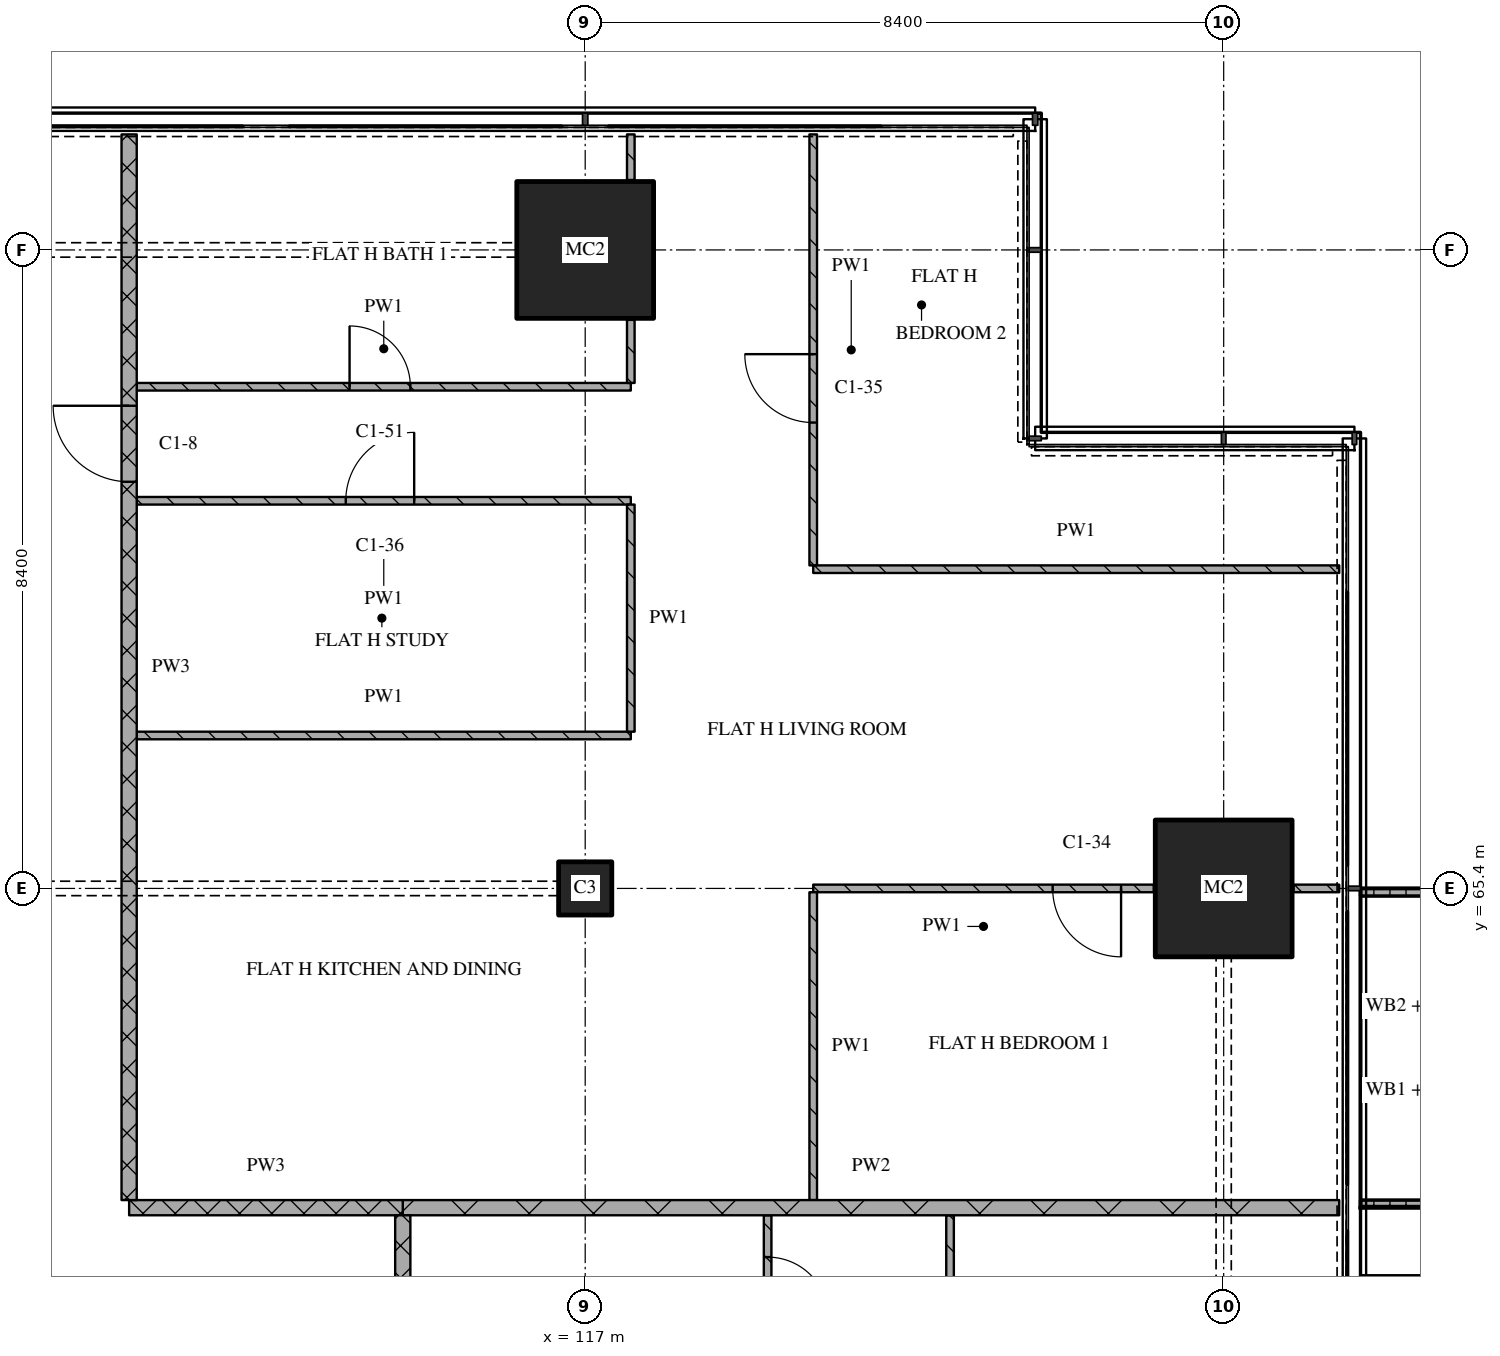
"""IFC4 building model, lengths in metres.
Left out: names, types, materials, properties, quantities, classifications, styles, units other than length and angle.
Written with IfcOpenShell. Run it as: python <this file> out.ifc"""

import sys

from ifc_helpers import new_model, si_unit, direction, frame, frame_2d, origin, origin_2d, place, context, subcontext, project, spatial, polyline, rectangle, outline, extrude, element, fill, save


model = new_model("IFC4")
c1 = context("Model", 3, precision=1e-05, world=origin(), true_north=direction((0.0, 1.0)))
c2 = subcontext(c1, "Body", "Model", "MODEL_VIEW")
j1 = project(units=[si_unit("LENGTHUNIT", "METRE"), si_unit("PLANEANGLEUNIT", "RADIAN")], contexts=[c1])
p1 = place(None, origin())
s1 = spatial("IfcSite", under=j1, at=p1, CompositionType="ELEMENT")
p2 = place(p1, origin())
s2 = spatial("IfcBuilding", under=s1, at=p2, CompositionType="ELEMENT")
p3 = place(p2, frame((0.0, 0.0, 154.65)))
s3 = spatial("IfcBuildingStorey", under=s2, at=p3, CompositionType="ELEMENT", Elevation=154.65)
p4 = place(p3, frame((117.0, 65.4, 0.0), z_axis=(0.0, 0.0, 1.0), x_axis=(1.0, 0.0, 0.0)))
e1 = element("IfcColumn", 1, at=p4, inside=s3, PredefinedType="COLUMN", context=c2, shape_type="SweptSolid", body=[
    extrude(rectangle(XDim=0.7, YDim=0.7, at=origin_2d()), origin(), (0.0, 0.0, 1.0), 3.6),
])
for number, where, z_axis, x_axis in (
    (2, (117.0, 73.8, 0.0), (0.0, 0.0, 1.0), (1.0, 0.0, 0.0)),
    (3, (125.4, 65.4, 0.0), (0.0, 0.0, 1.0), (1.0, 0.0, 0.0)),
):
    element("IfcColumn", number, at=place(p3, frame(where, z_axis=z_axis, x_axis=x_axis)), inside=s3, PredefinedType="COLUMN", context=c2, shape_type="SweptSolid", body=[
        extrude(rectangle(XDim=1.8, YDim=1.8, at=origin_2d()), origin(), (0.0, 0.0, 1.0), 3.6),
    ])
p5 = place(p3, origin())
e4 = element("IfcWall", 4, at=p5, inside=s3, PredefinedType="SOLIDWALL", context=c2, shape_type="SweptSolid", body=[
    extrude(outline(polyline([(127.2, 61.2), (127.2, 61.3), (128.833, 61.3), (128.833, 65.3), (127.2, 65.3), (127.2, 65.4), (128.933, 65.4), (128.933, 61.2), (127.2, 61.2)])), origin(), (0.0, 0.0, 1.0), 1.0),
])
p6 = place(p3, frame((111.0, 61.2, 0.0), z_axis=(0.0, 0.0, 1.0), x_axis=(1.0, 0.0, 0.0)))
e5 = element("IfcWall", 5, at=p6, inside=s3, PredefinedType="PARTITIONING", context=c2, shape_type="SweptSolid", body=[
    extrude(rectangle(XDim=3.6, YDim=0.2, at=frame_2d((1.8, 0.0))), origin(), (0.0, 0.0, 1.0), 3.32),
])
p7 = place(p3, frame((114.6, 61.2, 0.0), z_axis=(0.0, 0.0, 1.0), x_axis=(1.0, 0.0, 0.0)))
e6 = element("IfcWall", 6, at=p7, inside=s3, PredefinedType="PARTITIONING", context=c2, shape_type="SweptSolid", body=[
    extrude(rectangle(XDim=12.32, YDim=0.2, at=frame_2d((6.16, 0.0))), origin(), (0.0, 0.0, 1.0), 3.32),
])
p8 = place(p3, frame((124.48, 65.4, 0.0), z_axis=(0.0, 0.0, 1.0), x_axis=(-1.0, 0.0, 0.0)))
e7 = element("IfcWall", 7, at=p8, inside=s3, PredefinedType="PARTITIONING", context=c2, shape_type="SweptSolid", body=[
    extrude(rectangle(XDim=4.48, YDim=0.1, at=frame_2d((2.24, 0.0))), origin(), (0.0, 0.0, 1.0), 3.32),
])
p9 = place(p8, frame((0.43, 0.0, 0.0)))
e8 = element("IfcOpeningElement", 8, at=p9, cuts=e7, PredefinedType="OPENING", context=c2, shape_type="SweptSolid", body=[
    extrude(rectangle(XDim=0.9, YDim=2.1, at=frame_2d((0.45, 1.05))), frame((0.0, 0.06, 0.0), z_axis=(0.0, -1.0, 0.0), x_axis=(1.0, 0.0, 0.0)), (0.0, 0.0, 1.0), 0.12),
])
p10 = place(p3, frame((126.32, 65.4, 0.0), z_axis=(0.0, 0.0, 1.0), x_axis=(1.0, 0.0, 0.0)))
e9 = element("IfcWall", 9, at=p10, inside=s3, PredefinedType="PARTITIONING", context=c2, shape_type="SweptSolid", body=[
    extrude(rectangle(XDim=0.6, YDim=0.1, at=frame_2d((0.3, 0.0))), origin(), (0.0, 0.0, 1.0), 3.32),
])
p11 = place(p3, frame((111.1, 67.412, 0.0), z_axis=(0.0, 0.0, 1.0), x_axis=(1.0, 0.0, 0.0)))
e10 = element("IfcWall", 10, at=p11, inside=s3, PredefinedType="PARTITIONING", context=c2, shape_type="SweptSolid", body=[
    extrude(rectangle(XDim=6.5, YDim=0.1, at=frame_2d((3.25, 0.0))), origin(), (0.0, 0.0, 1.0), 3.32),
])
p12 = place(p3, frame((120.0, 69.6, 0.0), z_axis=(0.0, 0.0, 1.0), x_axis=(1.0, 0.0, 0.0)))
e11 = element("IfcWall", 11, at=p12, inside=s3, PredefinedType="PARTITIONING", context=c2, shape_type="SweptSolid", body=[
    extrude(rectangle(XDim=6.92, YDim=0.1, at=frame_2d((3.46, 0.0))), origin(), (0.0, 0.0, 1.0), 3.32),
])
p13 = place(p3, frame((117.6, 70.5, 0.0), z_axis=(0.0, 0.0, 1.0), x_axis=(-1.0, 0.0, 0.0)))
e12 = element("IfcWall", 12, at=p13, inside=s3, PredefinedType="PARTITIONING", context=c2, shape_type="SweptSolid", body=[
    extrude(rectangle(XDim=6.5, YDim=0.1, at=frame_2d((3.25, 0.0))), origin(), (0.0, 0.0, 1.0), 3.32),
])
p14 = place(p13, frame((2.85, 0.0, 0.0)))
e13 = element("IfcOpeningElement", 13, at=p14, cuts=e12, PredefinedType="OPENING", context=c2, shape_type="SweptSolid", body=[
    extrude(rectangle(XDim=0.9, YDim=2.1, at=frame_2d((0.45, 1.05))), frame((0.0, 0.06, 0.0), z_axis=(0.0, -1.0, 0.0), x_axis=(1.0, 0.0, 0.0)), (0.0, 0.0, 1.0), 0.12),
])
p15 = place(p3, frame((111.1, 72.0, 0.0), z_axis=(0.0, 0.0, 1.0), x_axis=(1.0, 0.0, 0.0)))
e14 = element("IfcWall", 14, at=p15, inside=s3, PredefinedType="PARTITIONING", context=c2, shape_type="SweptSolid", body=[
    extrude(rectangle(XDim=6.5, YDim=0.1, at=frame_2d((3.25, 0.0))), origin(), (0.0, 0.0, 1.0), 3.32),
])
p16 = place(p15, frame((2.8, 0.0, 0.0)))
e15 = element("IfcOpeningElement", 15, at=p16, cuts=e14, PredefinedType="OPENING", context=c2, shape_type="SweptSolid", body=[
    extrude(rectangle(XDim=0.8, YDim=2.1, at=frame_2d((0.4, 1.05))), frame((0.0, 0.06, 0.0), z_axis=(0.0, -1.0, 0.0), x_axis=(1.0, 0.0, 0.0)), (0.0, 0.0, 1.0), 0.12),
])
p17 = place(p3, frame((111.0, 75.32, 0.0), z_axis=(0.0, 0.0, 1.0), x_axis=(0.0, -1.0, 0.0)))
e16 = element("IfcWall", 16, at=p17, inside=s3, PredefinedType="PARTITIONING", context=c2, shape_type="SweptSolid", body=[
    extrude(rectangle(XDim=14.02, YDim=0.2, at=frame_2d((7.01, 0.0))), origin(), (0.0, 0.0, 1.0), 3.32),
])
p18 = place(p17, frame((3.57, 0.0, 0.0)))
e17 = element("IfcOpeningElement", 17, at=p18, cuts=e16, PredefinedType="OPENING", context=c2, shape_type="SweptSolid", body=[
    extrude(rectangle(XDim=1.0, YDim=2.1, at=frame_2d((0.5, 1.05))), frame((0.0, 0.11, 0.0), z_axis=(0.0, -1.0, 0.0), x_axis=(1.0, 0.0, 0.0)), (0.0, 0.0, 1.0), 0.22),
])
p19 = place(p3, frame((114.6, 61.1, 0.0), z_axis=(0.0, 0.0, 1.0), x_axis=(0.0, -1.0, 0.0)))
e18 = element("IfcWall", 18, at=p19, inside=s3, PredefinedType="PARTITIONING", context=c2, shape_type="SweptSolid", body=[
    extrude(rectangle(XDim=17.8, YDim=0.2, at=frame_2d((8.9, 0.0))), origin(), (0.0, 0.0, 1.0), 3.32),
])
p20 = place(p19, frame((4.65, 0.0, 0.0)))
e19 = element("IfcOpeningElement", 19, at=p20, cuts=e18, PredefinedType="OPENING", context=c2, shape_type="SweptSolid", body=[
    extrude(rectangle(XDim=1.0, YDim=2.1, at=frame_2d((0.5, 1.05))), frame((0.0, 0.11, 0.0), z_axis=(0.0, -1.0, 0.0), x_axis=(1.0, 0.0, 0.0)), (0.0, 0.0, 1.0), 0.22),
])
p21 = place(p3, frame((117.6, 70.45, 0.0), z_axis=(0.0, 0.0, 1.0), x_axis=(0.0, -1.0, 0.0)))
e20 = element("IfcWall", 20, at=p21, inside=s3, PredefinedType="PARTITIONING", context=c2, shape_type="SweptSolid", body=[
    extrude(rectangle(XDim=2.988, YDim=0.1, at=frame_2d((1.494, 0.0))), origin(), (0.0, 0.0, 1.0), 3.32),
])
p22 = place(p3, frame((117.6, 72.88, 0.0), z_axis=(0.0, 0.0, 1.0), x_axis=(0.0, -1.0, 0.0)))
e21 = element("IfcWall", 21, at=p22, inside=s3, PredefinedType="PARTITIONING", context=c2, shape_type="SweptSolid", body=[
    extrude(rectangle(XDim=0.83, YDim=0.1, at=frame_2d((0.415, 0.0))), origin(), (0.0, 0.0, 1.0), 3.32),
])
p23 = place(p3, frame((117.6, 75.32, 0.0), z_axis=(0.0, 0.0, 1.0), x_axis=(0.0, -1.0, 0.0)))
e22 = element("IfcWall", 22, at=p23, inside=s3, PredefinedType="PARTITIONING", context=c2, shape_type="SweptSolid", body=[
    extrude(rectangle(XDim=0.6, YDim=0.1, at=frame_2d((0.3, 0.0))), origin(), (0.0, 0.0, 1.0), 3.32),
])
p24 = place(p3, frame((119.4, 56.75, 0.0), z_axis=(0.0, 0.0, 1.0), x_axis=(0.0, 1.0, 0.0)))
e23 = element("IfcWall", 23, at=p24, inside=s3, PredefinedType="PARTITIONING", context=c2, shape_type="SweptSolid", body=[
    extrude(rectangle(XDim=4.35, YDim=0.1, at=frame_2d((2.175, 0.0))), origin(), (0.0, 0.0, 1.0), 3.32),
])
p25 = place(p24, frame((3.0, 0.0, 0.0)))
e24 = element("IfcOpeningElement", 24, at=p25, cuts=e23, PredefinedType="OPENING", context=c2, shape_type="SweptSolid", body=[
    extrude(rectangle(XDim=0.8, YDim=2.1, at=frame_2d((0.4, 1.05))), frame((0.0, 0.06, 0.0), z_axis=(0.0, -1.0, 0.0), x_axis=(1.0, 0.0, 0.0)), (0.0, 0.0, 1.0), 0.12),
])
p26 = place(p3, frame((120.0, 65.35, 0.0), z_axis=(0.0, 0.0, 1.0), x_axis=(0.0, -1.0, 0.0)))
e25 = element("IfcWall", 25, at=p26, inside=s3, PredefinedType="PARTITIONING", context=c2, shape_type="SweptSolid", body=[
    extrude(rectangle(XDim=4.05, YDim=0.1, at=frame_2d((2.025, 0.0))), origin(), (0.0, 0.0, 1.0), 3.32),
])
p27 = place(p3, frame((120.0, 75.32, 0.0), z_axis=(0.0, 0.0, 1.0), x_axis=(0.0, -1.0, 0.0)))
e26 = element("IfcWall", 26, at=p27, inside=s3, PredefinedType="PARTITIONING", context=c2, shape_type="SweptSolid", body=[
    extrude(rectangle(XDim=5.67, YDim=0.1, at=frame_2d((2.835, 0.0))), origin(), (0.0, 0.0, 1.0), 3.32),
])
p28 = place(p27, frame((2.891, 0.0, 0.0)))
e27 = element("IfcOpeningElement", 27, at=p28, cuts=e26, PredefinedType="OPENING", context=c2, shape_type="SweptSolid", body=[
    extrude(rectangle(XDim=0.9, YDim=2.1, at=frame_2d((0.45, 1.05))), frame((0.0, 0.06, 0.0), z_axis=(0.0, -1.0, 0.0), x_axis=(1.0, 0.0, 0.0)), (0.0, 0.0, 1.0), 0.12),
])
p29 = place(p3, frame((121.8, 61.1, 0.0), z_axis=(0.0, 0.0, 1.0), x_axis=(0.0, -1.0, 0.0)))
e28 = element("IfcWall", 28, at=p29, inside=s3, PredefinedType="PARTITIONING", context=c2, shape_type="SweptSolid", body=[
    extrude(rectangle(XDim=8.25, YDim=0.1, at=frame_2d((4.125, 0.0))), origin(), (0.0, 0.0, 1.0), 3.32),
])
p30 = place(p29, frame((3.65, 0.0, 0.0)))
e29 = element("IfcOpeningElement", 29, at=p30, cuts=e28, PredefinedType="OPENING", context=c2, shape_type="SweptSolid", body=[
    extrude(rectangle(XDim=0.9, YDim=2.1, at=frame_2d((0.45, 1.05))), frame((0.0, 0.06, 0.0), z_axis=(0.0, -1.0, 0.0), x_axis=(1.0, 0.0, 0.0)), (0.0, 0.0, 1.0), 0.12),
])
p31 = place(p9, origin())
e30 = element("IfcDoor", 30, at=p31, inside=s3, OperationType="SINGLE_SWING_LEFT", PredefinedType="DOOR", context=c2, shape_type="SweptSolid", body=[
    extrude(rectangle(XDim=0.9, YDim=2.1, at=frame_2d((0.45, 1.05))), frame((0.0, 0.025, 0.0), z_axis=(0.0, -1.0, 0.0), x_axis=(1.0, 0.0, 0.0)), (0.0, 0.0, 1.0), 0.05),
])
fill(e8, e30)
p32 = place(p14, origin())
e31 = element("IfcDoor", 31, at=p32, inside=s3, OperationType="SINGLE_SWING_RIGHT", PredefinedType="DOOR", context=c2, shape_type="SweptSolid", body=[
    extrude(rectangle(XDim=0.9, YDim=2.1, at=frame_2d((0.45, 1.05))), frame((0.0, 0.025, 0.0), z_axis=(0.0, -1.0, 0.0), x_axis=(1.0, 0.0, 0.0)), (0.0, 0.0, 1.0), 0.05),
])
fill(e13, e31)
p33 = place(p16, origin())
e32 = element("IfcDoor", 32, at=p33, inside=s3, OperationType="SINGLE_SWING_LEFT", PredefinedType="DOOR", context=c2, shape_type="SweptSolid", body=[
    extrude(rectangle(XDim=0.8, YDim=2.1, at=frame_2d((0.4, 1.05))), frame((0.0, 0.025, 0.0), z_axis=(0.0, -1.0, 0.0), x_axis=(1.0, 0.0, 0.0)), (0.0, 0.0, 1.0), 0.05),
])
fill(e15, e32)
p34 = place(p18, origin())
e33 = element("IfcDoor", 33, at=p34, inside=s3, OperationType="SINGLE_SWING_RIGHT", PredefinedType="DOOR", context=c2, shape_type="SweptSolid", body=[
    extrude(rectangle(XDim=1.0, YDim=2.1, at=frame_2d((0.5, 1.05))), frame((0.0, 0.025, 0.0), z_axis=(0.0, -1.0, 0.0), x_axis=(1.0, 0.0, 0.0)), (0.0, 0.0, 1.0), 0.05),
])
fill(e17, e33)
p35 = place(p25, origin())
e34 = element("IfcDoor", 34, at=p35, inside=s3, OperationType="SINGLE_SWING_RIGHT", PredefinedType="DOOR", context=c2, shape_type="SweptSolid", body=[
    extrude(rectangle(XDim=0.8, YDim=2.1, at=frame_2d((0.4, 1.05))), frame((0.0, 0.025, 0.0), z_axis=(0.0, -1.0, 0.0), x_axis=(1.0, 0.0, 0.0)), (0.0, 0.0, 1.0), 0.05),
])
fill(e24, e34)
p36 = place(p28, origin())
e35 = element("IfcDoor", 35, at=p36, inside=s3, OperationType="SINGLE_SWING_RIGHT", PredefinedType="DOOR", context=c2, shape_type="SweptSolid", body=[
    extrude(rectangle(XDim=0.9, YDim=2.1, at=frame_2d((0.45, 1.05))), frame((0.0, 0.025, 0.0), z_axis=(0.0, -1.0, 0.0), x_axis=(1.0, 0.0, 0.0)), (0.0, 0.0, 1.0), 0.05),
])
fill(e27, e35)
save(model, sys.argv[1])
